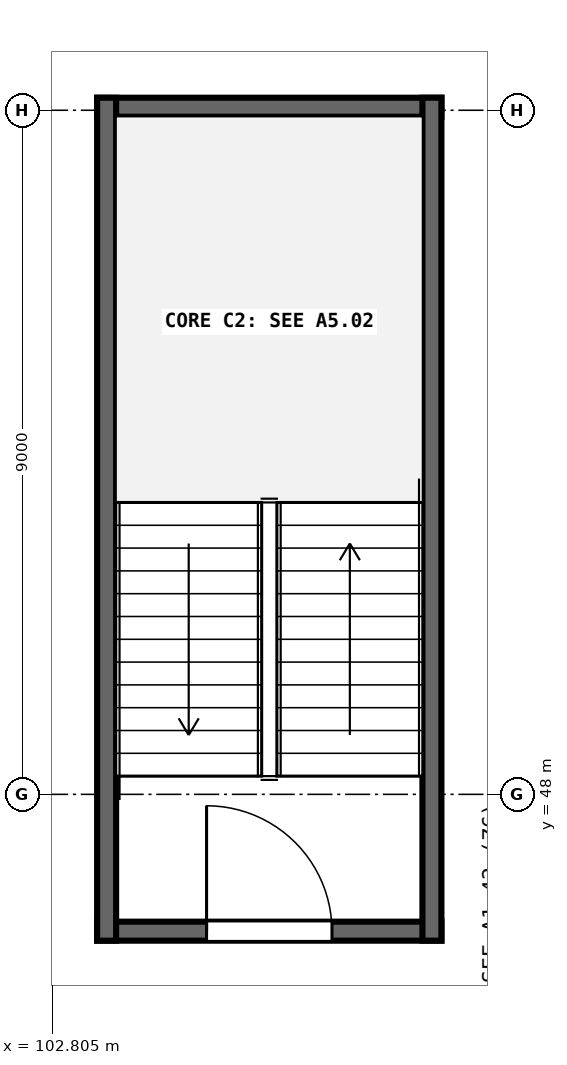
"""IFC4 building model, lengths in metres.
Left out: names, types, materials, properties, quantities, classifications, styles, units other than length and angle.
Written with IfcOpenShell. Run it as: python <this file> out.ifc"""

import sys

from ifc_helpers import new_model, si_unit, direction, frame, frame_2d, origin, place, context, subcontext, project, spatial, rectangle, extrude, element, fill, save


model = new_model("IFC4")
c1 = context("Model", 3, precision=1e-05, world=origin(), true_north=direction((0.0, 1.0)))
c2 = subcontext(c1, "Body", "Model", "MODEL_VIEW")
j1 = project(units=[si_unit("LENGTHUNIT", "METRE"), si_unit("PLANEANGLEUNIT", "RADIAN")], contexts=[c1])
p1 = place(None, origin())
s1 = spatial("IfcSite", under=j1, at=p1, CompositionType="ELEMENT")
p2 = place(p1, origin())
s2 = spatial("IfcBuilding", under=s1, at=p2, CompositionType="ELEMENT")
p3 = place(p2, frame((0.0, 0.0, 14.7)))
s3 = spatial("IfcBuildingStorey", under=s2, at=p3, CompositionType="ELEMENT", Elevation=14.7)
p4 = place(p3, frame((103.395, 46.2, 0.0), z_axis=(0.0, 0.0, 1.0), x_axis=(1.0, 0.0, 0.0)))
e1 = element("IfcWall", 1, at=p4, inside=s3, PredefinedType="SHEAR", context=c2, shape_type="SweptSolid", body=[
    extrude(rectangle(XDim=4.53, YDim=0.25, at=frame_2d((2.265, 0.0))), origin(), (0.0, 0.0, 1.0), 4.25),
])
p5 = place(p4, frame((1.44, 0.0, 0.0)))
e2 = element("IfcOpeningElement", 2, at=p5, cuts=e1, PredefinedType="OPENING", context=c2, shape_type="SweptSolid", body=[
    extrude(rectangle(XDim=1.65, YDim=2.22, at=frame_2d((0.825, 1.11))), frame((0.0, 0.135, 0.0), z_axis=(0.0, -1.0, 0.0), x_axis=(1.0, 0.0, 0.0)), (0.0, 0.0, 1.0), 0.27),
])
p6 = place(p3, frame((103.395, 57.04, 0.0), z_axis=(0.0, 0.0, 1.0), x_axis=(1.0, 0.0, 0.0)))
e3 = element("IfcWall", 3, at=p6, inside=s3, PredefinedType="SHEAR", context=c2, shape_type="SweptSolid", body=[
    extrude(rectangle(XDim=4.53, YDim=0.25, at=frame_2d((2.265, 0.0))), origin(), (0.0, 0.0, 1.0), 4.25),
])
for number, where, z_axis, x_axis in (
    (4, (103.52, 46.075, 0.0), (0.0, 0.0, 1.0), (0.0, 1.0, 0.0)),
    (5, (107.8, 46.075, 0.0), (0.0, 0.0, 1.0), (0.0, 1.0, 0.0)),
):
    element("IfcWall", number, at=place(p3, frame(where, z_axis=z_axis, x_axis=x_axis)), inside=s3, PredefinedType="SHEAR", context=c2, shape_type="SweptSolid", body=[
        extrude(rectangle(XDim=11.09, YDim=0.25, at=frame_2d((5.545, 0.0))), origin(), (0.0, 0.0, 1.0), 4.25),
    ])
p7 = place(p5, origin())
e6 = element("IfcDoor", 6, at=p7, inside=s3, OperationType="SINGLE_SWING_LEFT", PredefinedType="DOOR", context=c2, shape_type="SweptSolid", body=[
    extrude(rectangle(XDim=1.65, YDim=2.22, at=frame_2d((0.825, 1.11))), frame((0.0, 0.025, 0.0), z_axis=(0.0, -1.0, 0.0), x_axis=(1.0, 0.0, 0.0)), (0.0, 0.0, 1.0), 0.05),
])
fill(e2, e6)
save(model, sys.argv[1])
